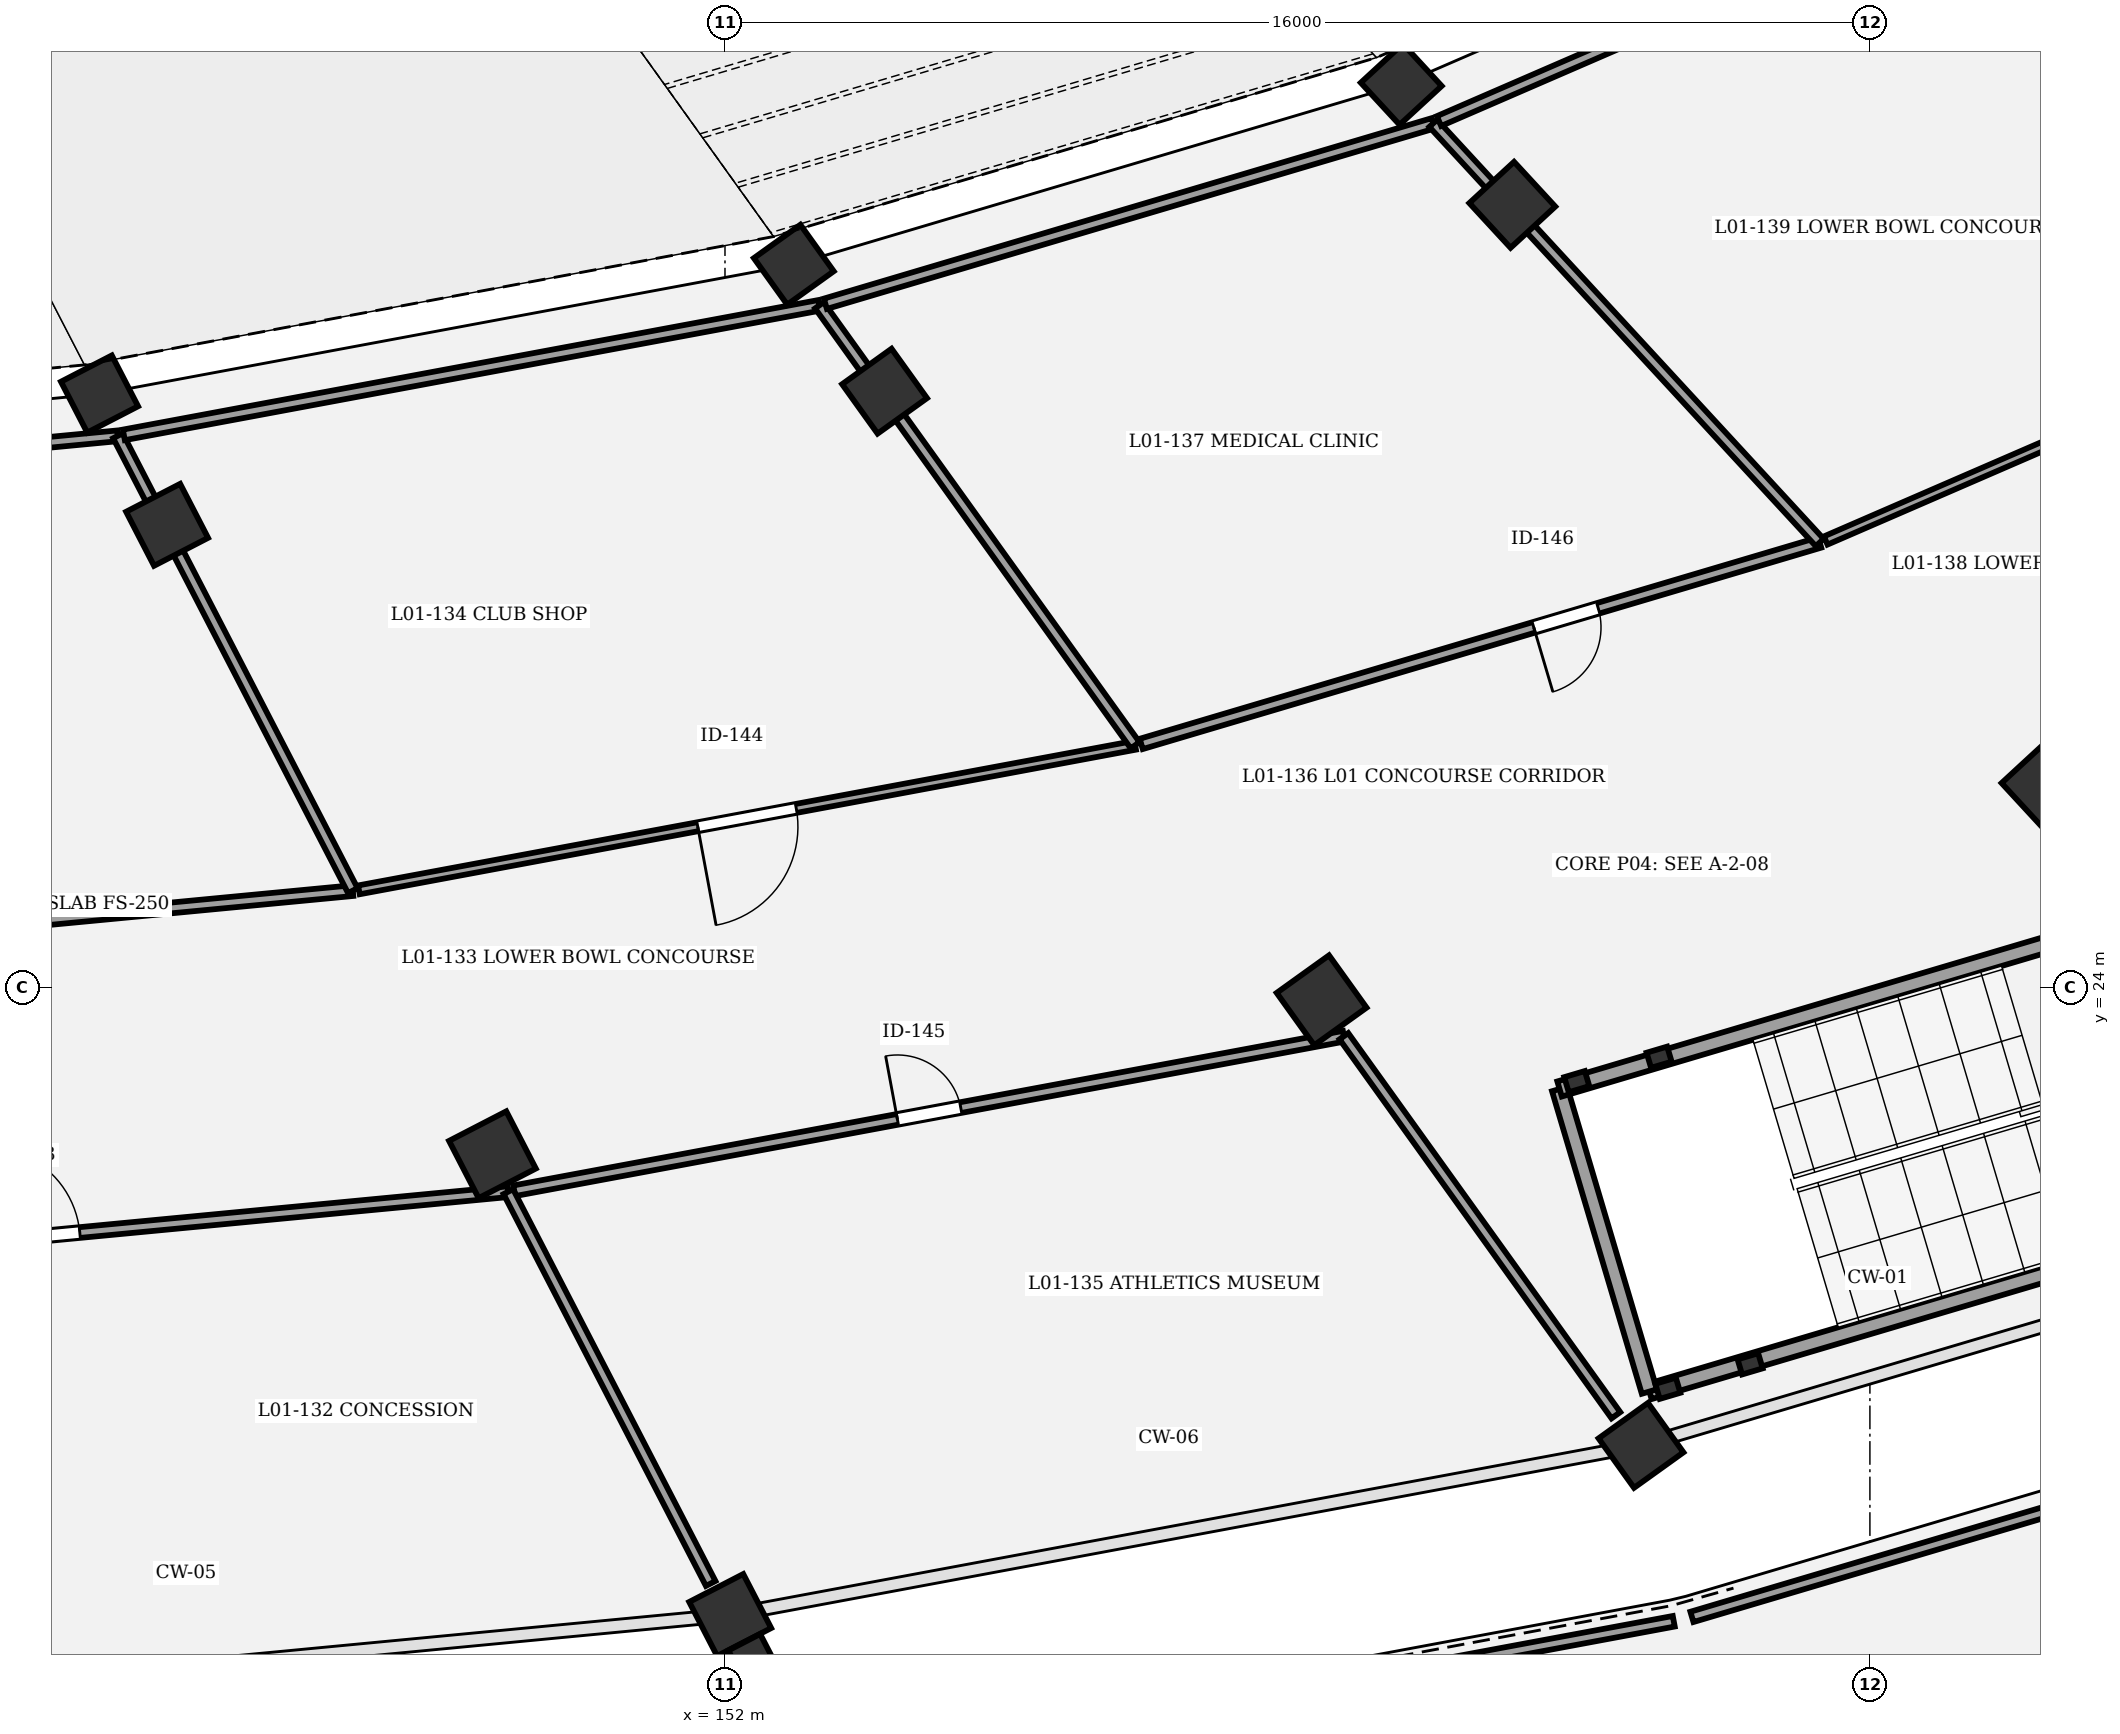
"""IFC4 building model, lengths in metres.
Left out: names, types, materials, properties, quantities, classifications, styles, units other than length and angle.
Written with IfcOpenShell. Run it as: python <this file> out.ifc"""

import sys

from ifc_helpers import new_model, si_unit, direction, frame, frame_2d, origin, origin_2d, place, context, subcontext, project, spatial, rectangle, extrude, element, fill, save


model = new_model("IFC4")
c1 = context("Model", 3, precision=1e-05, world=origin(), true_north=direction((0.0, 1.0)))
c2 = subcontext(c1, "Body", "Model", "MODEL_VIEW")
j1 = project(units=[si_unit("LENGTHUNIT", "METRE"), si_unit("PLANEANGLEUNIT", "RADIAN")], contexts=[c1])
p1 = place(None, origin())
s1 = spatial("IfcSite", under=j1, at=p1, CompositionType="ELEMENT")
p2 = place(p1, origin())
s2 = spatial("IfcBuilding", under=s1, at=p2, CompositionType="ELEMENT")
p3 = place(p2, frame((0.0, 0.0, 5.4)))
s3 = spatial("IfcBuildingStorey", under=s2, at=p3, CompositionType="ELEMENT", Elevation=5.4)
p4 = place(p3, frame((143.259, 32.294, 0.0), z_axis=(0.0, 0.0, 1.0), x_axis=(0.458959712465, -0.888457079624, 0.0)))
e1 = element("IfcColumn", 1, at=p4, inside=s3, PredefinedType="COLUMN", context=c2, shape_type="SweptSolid", body=[
    extrude(rectangle(XDim=0.8, YDim=0.8, at=origin_2d()), origin(), (0.0, 0.0, 1.0), 4.8),
])
p5 = place(p3, frame((144.204, 30.466, 0.0), z_axis=(0.0, 0.0, 1.0), x_axis=(0.458959712465, -0.888457079624, 0.0)))
e2 = element("IfcColumn", 2, at=p5, inside=s3, PredefinedType="COLUMN", context=c2, shape_type="SweptSolid", body=[
    extrude(rectangle(XDim=0.85, YDim=0.85, at=origin_2d()), origin(), (0.0, 0.0, 1.0), 4.8),
])
p6 = place(p3, frame((148.75, 21.665, 0.0), z_axis=(0.0, 0.0, 1.0), x_axis=(0.458959712465, -0.888457079624, 0.0)))
e3 = element("IfcColumn", 3, at=p6, inside=s3, PredefinedType="COLUMN", context=c2, shape_type="SweptSolid", body=[
    extrude(rectangle(XDim=0.9, YDim=0.9, at=origin_2d()), origin(), (0.0, 0.0, 1.0), 4.8),
])
p7 = place(p3, frame((152.073, 15.233, 0.0), z_axis=(0.0, 0.0, 1.0), x_axis=(0.458959712465, -0.888457079624, 0.0)))
e4 = element("IfcColumn", 4, at=p7, inside=s3, PredefinedType="COLUMN", context=c2, shape_type="SweptSolid", body=[
    extrude(rectangle(XDim=0.85, YDim=0.85, at=origin_2d()), origin(), (0.0, 0.0, 1.0), 4.8),
])
p8 = place(p3, frame((152.35, 14.697, 0.0), z_axis=(0.0, 0.0, 1.0), x_axis=(0.888457079624, 0.458959712465, 0.0)))
e5 = element("IfcColumn", 5, at=p8, inside=s3, PredefinedType="PILASTER", context=c2, shape_type="SweptSolid", body=[
    extrude(rectangle(XDim=0.5, YDim=0.35, at=origin_2d()), origin(), (0.0, 0.0, 1.0), 4.8),
])
p9 = place(p3, frame((152.962, 34.101, 0.0), z_axis=(0.0, 0.0, 1.0), x_axis=(0.582974127943, -0.812490717577, 0.0)))
e6 = element("IfcColumn", 6, at=p9, inside=s3, PredefinedType="COLUMN", context=c2, shape_type="SweptSolid", body=[
    extrude(rectangle(XDim=0.8, YDim=0.8, at=origin_2d()), origin(), (0.0, 0.0, 1.0), 4.8),
])
p10 = place(p3, frame((154.23, 32.333, 0.0), z_axis=(0.0, 0.0, 1.0), x_axis=(0.582974127943, -0.812490717577, 0.0)))
e7 = element("IfcColumn", 7, at=p10, inside=s3, PredefinedType="COLUMN", context=c2, shape_type="SweptSolid", body=[
    extrude(rectangle(XDim=0.85, YDim=0.85, at=origin_2d()), origin(), (0.0, 0.0, 1.0), 4.8),
])
p11 = place(p3, frame((160.338, 23.823, 0.0), z_axis=(0.0, 0.0, 1.0), x_axis=(0.582974127943, -0.812490717577, 0.0)))
e8 = element("IfcColumn", 8, at=p11, inside=s3, PredefinedType="COLUMN", context=c2, shape_type="SweptSolid", body=[
    extrude(rectangle(XDim=0.9, YDim=0.9, at=origin_2d()), origin(), (0.0, 0.0, 1.0), 4.8),
])
p12 = place(p3, frame((164.801, 17.603, 0.0), z_axis=(0.0, 0.0, 1.0), x_axis=(0.582974127943, -0.812490717577, 0.0)))
e9 = element("IfcColumn", 9, at=p12, inside=s3, PredefinedType="COLUMN", context=c2, shape_type="SweptSolid", body=[
    extrude(rectangle(XDim=0.85, YDim=0.85, at=origin_2d()), origin(), (0.0, 0.0, 1.0), 4.8),
])
p13 = place(p3, frame((161.45, 36.621, 0.0), z_axis=(0.0, 0.0, 1.0), x_axis=(0.677903094969, -0.735151272753, 0.0)))
e10 = element("IfcColumn", 10, at=p13, inside=s3, PredefinedType="COLUMN", context=c2, shape_type="SweptSolid", body=[
    extrude(rectangle(XDim=0.8, YDim=0.8, at=origin_2d()), origin(), (0.0, 0.0, 1.0), 4.8),
])
p14 = place(p3, frame((163.003, 34.938, 0.0), z_axis=(0.0, 0.0, 1.0), x_axis=(0.677903094969, -0.735151272753, 0.0)))
e11 = element("IfcColumn", 11, at=p14, inside=s3, PredefinedType="COLUMN", context=c2, shape_type="SweptSolid", body=[
    extrude(rectangle(XDim=0.85, YDim=0.85, at=origin_2d()), origin(), (0.0, 0.0, 1.0), 4.8),
])
p15 = place(p3, frame((170.476, 26.832, 0.0), z_axis=(0.0, 0.0, 1.0), x_axis=(0.677903094969, -0.735151272753, 0.0)))
e12 = element("IfcColumn", 12, at=p15, inside=s3, PredefinedType="COLUMN", context=c2, shape_type="SweptSolid", body=[
    extrude(rectangle(XDim=0.9, YDim=0.9, at=origin_2d()), origin(), (0.0, 0.0, 1.0), 4.8),
])
for number, where, z_axis, x_axis in (
    (13, (165.054, 23.027, 0.0), (0.0, 0.0, 1.0), (-0.959, -0.285, 0.0)),
    (14, (163.904, 22.686, 0.0), (0.0, 0.0, 1.0), (-0.959, -0.285, 0.0)),
    (15, (165.176, 18.4, 0.0), (0.0, 0.0, 1.0), (-0.959, -0.285, 0.0)),
    (16, (166.326, 18.742, 0.0), (0.0, 0.0, 1.0), (-0.959, -0.285, 0.0)),
):
    element("IfcColumn", number, at=place(p3, frame(where, z_axis=z_axis, x_axis=x_axis)), inside=s3, PredefinedType="COLUMN", context=c2, shape_type="SweptSolid", body=[
        extrude(rectangle(XDim=0.3, YDim=0.22, at=origin_2d()), origin(), (0.0, 0.0, 1.0), 4.8),
    ])
p16 = place(p3, frame((173.105, 20.785, 0.0), z_axis=(0.0, 0.0, 1.0), x_axis=(-0.958675743706, -0.284500998997, 0.0)))
e17 = element("IfcWall", 17, at=p16, inside=s3, PredefinedType="SHEAR", context=c2, shape_type="SweptSolid", body=[
    extrude(rectangle(XDim=8.54, YDim=0.22, at=frame_2d((4.27, 0.0))), origin(), (0.0, 0.0, 1.0), 4.55),
])
p17 = place(p3, frame((163.663, 22.583, 0.0), z_axis=(0.0, 0.0, 1.0), x_axis=(0.284497328872, -0.958676832861, 0.0)))
e18 = element("IfcWall", 18, at=p17, inside=s3, PredefinedType="SHEAR", context=c2, shape_type="SweptSolid", body=[
    extrude(rectangle(XDim=4.41, YDim=0.22, at=frame_2d((2.205, 0.0))), origin(), (0.0, 0.0, 1.0), 4.55),
])
p18 = place(p3, frame((171.85, 25.013, 0.0), z_axis=(0.0, 0.0, 1.0), x_axis=(-0.95867342973, -0.284508796227, 0.0)))
e19 = element("IfcWall", 19, at=p18, inside=s3, PredefinedType="SHEAR", context=c2, shape_type="SweptSolid", body=[
    extrude(rectangle(XDim=8.54, YDim=0.22, at=frame_2d((4.27, 0.0))), origin(), (0.0, 0.0, 1.0), 4.55),
])
p19 = place(p18, frame((0.3, 0.0, 0.0)))
e20 = element("IfcOpeningElement", 20, at=p19, cuts=e19, PredefinedType="OPENING", context=c2, shape_type="SweptSolid", body=[
    extrude(rectangle(XDim=1.15, YDim=2.15, at=frame_2d((0.575, 1.075))), frame((0.0, 0.12, 0.0), z_axis=(0.0, -1.0, 0.0), x_axis=(1.0, 0.0, 0.0)), (0.0, 0.0, 1.0), 0.24),
])
p20 = place(p3, frame((146.799, 25.355, 0.0), z_axis=(0.0, 0.0, 1.0), x_axis=(-0.995485111947, -0.094917816515, 0.0)))
e21 = element("IfcWall", 21, at=p20, inside=s3, PredefinedType="PARTITIONING", context=c2, shape_type="SweptSolid", body=[
    extrude(rectangle(XDim=12.822, YDim=0.15, at=frame_2d((6.411, 0.0))), origin(), (0.0, 0.0, 1.0), 3.55),
])
p21 = place(p20, frame((5.781, 0.0, 0.0)))
e22 = element("IfcOpeningElement", 22, at=p21, cuts=e21, PredefinedType="OPENING", context=c2, shape_type="SweptSolid", body=[
    extrude(rectangle(XDim=1.26, YDim=2.3, at=frame_2d((0.63, 1.15))), frame((0.0, 0.085, 0.0), z_axis=(0.0, -1.0, 0.0), x_axis=(1.0, 0.0, 0.0)), (0.0, 0.0, 1.0), 0.17),
])
p22 = place(p3, frame((135.681, 19.881, 0.0), z_axis=(0.0, 0.0, 1.0), x_axis=(0.995484535327, 0.094923863827, 0.0)))
e23 = element("IfcWall", 23, at=p22, inside=s3, PredefinedType="PARTITIONING", context=c2, shape_type="SweptSolid", body=[
    extrude(rectangle(XDim=13.351, YDim=0.15, at=frame_2d((6.676, 0.0))), origin(), (0.0, 0.0, 1.0), 3.55),
])
p23 = place(p22, frame((6.015, 0.0, 0.0)))
e24 = element("IfcOpeningElement", 24, at=p23, cuts=e23, PredefinedType="OPENING", context=c2, shape_type="SweptSolid", body=[
    extrude(rectangle(XDim=1.32, YDim=2.3, at=frame_2d((0.66, 1.15))), frame((0.0, 0.085, 0.0), z_axis=(0.0, -1.0, 0.0), x_axis=(1.0, 0.0, 0.0)), (0.0, 0.0, 1.0), 0.17),
])
p24 = place(p3, frame((157.732, 27.386, 0.0), z_axis=(0.0, 0.0, 1.0), x_axis=(-0.983097372707, -0.183083466695, 0.0)))
e25 = element("IfcWall", 25, at=p24, inside=s3, PredefinedType="PARTITIONING", context=c2, shape_type="SweptSolid", body=[
    extrude(rectangle(XDim=11.035, YDim=0.125, at=frame_2d((5.517, 0.0))), origin(), (0.0, 0.0, 1.0), 3.55),
])
p25 = place(p24, frame((4.817, 0.0, 0.0)))
e26 = element("IfcOpeningElement", 26, at=p25, cuts=e25, PredefinedType="OPENING", context=c2, shape_type="SweptSolid", body=[
    extrude(rectangle(XDim=1.4, YDim=2.3, at=frame_2d((0.7, 1.15))), frame((0.0, 0.073, 0.0), z_axis=(0.0, -1.0, 0.0), x_axis=(1.0, 0.0, 0.0)), (0.0, 0.0, 1.0), 0.145),
])
p26 = place(p3, frame((149.055, 21.161, 0.0), z_axis=(0.0, 0.0, 1.0), x_axis=(0.983095748229, 0.183092189385, 0.0)))
e27 = element("IfcWall", 27, at=p26, inside=s3, PredefinedType="PARTITIONING", context=c2, shape_type="SweptSolid", body=[
    extrude(rectangle(XDim=11.793, YDim=0.15, at=frame_2d((5.896, 0.0))), origin(), (0.0, 0.0, 1.0), 3.55),
])
p27 = place(p26, frame((5.447, 0.0, 0.0)))
e28 = element("IfcOpeningElement", 28, at=p27, cuts=e27, PredefinedType="OPENING", context=c2, shape_type="SweptSolid", body=[
    extrude(rectangle(XDim=0.9, YDim=2.1, at=frame_2d((0.45, 1.05))), frame((0.0, 0.085, 0.0), z_axis=(0.0, -1.0, 0.0), x_axis=(1.0, 0.0, 0.0)), (0.0, 0.0, 1.0), 0.17),
])
p28 = place(p3, frame((167.299, 30.219, 0.0), z_axis=(0.0, 0.0, 1.0), x_axis=(-0.958655809656, -0.284568161629, 0.0)))
e29 = element("IfcWall", 29, at=p28, inside=s3, PredefinedType="PARTITIONING", context=c2, shape_type="SweptSolid", body=[
    extrude(rectangle(XDim=9.891, YDim=0.15, at=frame_2d((4.946, 0.0))), origin(), (0.0, 0.0, 1.0), 3.55),
])
p29 = place(p28, frame((3.229, 0.0, 0.0)))
e30 = element("IfcOpeningElement", 30, at=p29, cuts=e29, PredefinedType="OPENING", context=c2, shape_type="SweptSolid", body=[
    extrude(rectangle(XDim=0.94, YDim=2.1, at=frame_2d((0.47, 1.05))), frame((0.0, 0.085, 0.0), z_axis=(0.0, -1.0, 0.0), x_axis=(1.0, 0.0, 0.0)), (0.0, 0.0, 1.0), 0.17),
])
p30 = place(p3, frame((175.685, 33.846, 0.0), z_axis=(0.0, 0.0, 1.0), x_axis=(-0.917494590455, -0.397748257677, 0.0)))
e31 = element("IfcWall", 31, at=p30, inside=s3, PredefinedType="PARTITIONING", context=c2, shape_type="SweptSolid", body=[
    extrude(rectangle(XDim=9.049, YDim=0.125, at=frame_2d((4.525, 0.0))), origin(), (0.0, 0.0, 1.0), 3.55),
])
p31 = place(p30, frame((1.806, 0.0, 0.0)))
e32 = element("IfcOpeningElement", 32, at=p31, cuts=e31, PredefinedType="OPENING", context=c2, shape_type="SweptSolid", body=[
    extrude(rectangle(XDim=0.98, YDim=2.1, at=frame_2d((0.49, 1.05))), frame((0.0, 0.073, 0.0), z_axis=(0.0, -1.0, 0.0), x_axis=(1.0, 0.0, 0.0)), (0.0, 0.0, 1.0), 0.145),
])
p32 = place(p3, frame((132.076, 30.619, 0.0), z_axis=(0.0, 0.0, 1.0), x_axis=(0.995484580871, 0.094923386203, 0.0)))
e33 = element("IfcWall", 33, at=p32, inside=s3, PredefinedType="PARTITIONING", context=c2, shape_type="SweptSolid", body=[
    extrude(rectangle(XDim=11.492, YDim=0.15, at=frame_2d((5.746, 0.0))), origin(), (0.0, 0.0, 1.0), 3.55),
])
p33 = place(p3, frame((143.516, 31.71, 0.0), z_axis=(0.0, 0.0, 1.0), x_axis=(0.458942826051, -0.888465802615, 0.0)))
e34 = element("IfcWall", 34, at=p33, inside=s3, PredefinedType="PARTITIONING", context=c2, shape_type="SweptSolid", body=[
    extrude(rectangle(XDim=7.153, YDim=0.15, at=frame_2d((3.577, 0.0))), origin(), (0.0, 0.0, 1.0), 3.55),
])
p34 = place(p3, frame((148.972, 21.148, 0.0), z_axis=(0.0, 0.0, 1.0), x_axis=(0.45896480759, -0.888454447563, 0.0)))
e35 = element("IfcWall", 35, at=p34, inside=s3, PredefinedType="PARTITIONING", context=c2, shape_type="SweptSolid", body=[
    extrude(rectangle(XDim=6.163, YDim=0.15, at=frame_2d((3.081, 0.0))), origin(), (0.0, 0.0, 1.0), 3.55),
])
p35 = place(p3, frame((143.599, 31.723, 0.0), z_axis=(0.0, 0.0, 1.0), x_axis=(0.98309647403, 0.183088292225, 0.0)))
e36 = element("IfcWall", 36, at=p35, inside=s3, PredefinedType="PARTITIONING", context=c2, shape_type="SweptSolid", body=[
    extrude(rectangle(XDim=9.888, YDim=0.15, at=frame_2d((4.944, 0.0))), origin(), (0.0, 0.0, 1.0), 3.55),
])
p36 = place(p3, frame((153.32, 33.533, 0.0), z_axis=(0.0, 0.0, 1.0), x_axis=(0.583043547447, -0.812440903562, 0.0)))
e37 = element("IfcWall", 37, at=p36, inside=s3, PredefinedType="PARTITIONING", context=c2, shape_type="SweptSolid", body=[
    extrude(rectangle(XDim=7.567, YDim=0.15, at=frame_2d((3.783, 0.0))), origin(), (0.0, 0.0, 1.0), 3.55),
])
p37 = place(p3, frame((160.649, 23.32, 0.0), z_axis=(0.0, 0.0, 1.0), x_axis=(0.58306104439, -0.812428346696, 0.0)))
e38 = element("IfcWall", 38, at=p37, inside=s3, PredefinedType="PARTITIONING", context=c2, shape_type="SweptSolid", body=[
    extrude(rectangle(XDim=6.52, YDim=0.15, at=frame_2d((3.26, 0.0))), origin(), (0.0, 0.0, 1.0), 3.55),
])
p38 = place(p3, frame((153.403, 33.555, 0.0), z_axis=(0.0, 0.0, 1.0), x_axis=(0.958654852333, 0.284571386646, 0.0)))
e39 = element("IfcWall", 39, at=p38, inside=s3, PredefinedType="PARTITIONING", context=c2, shape_type="SweptSolid", body=[
    extrude(rectangle(XDim=8.862, YDim=0.15, at=frame_2d((4.431, 0.0))), origin(), (0.0, 0.0, 1.0), 3.55),
])
p39 = place(p3, frame((161.898, 36.077, 0.0), z_axis=(0.0, 0.0, 1.0), x_axis=(0.677844741579, -0.735205077726, 0.0)))
e40 = element("IfcWall", 40, at=p39, inside=s3, PredefinedType="PARTITIONING", context=c2, shape_type="SweptSolid", body=[
    extrude(rectangle(XDim=7.968, YDim=0.15, at=frame_2d((3.984, 0.0))), origin(), (0.0, 0.0, 1.0), 3.55),
])
p40 = place(p3, frame((161.978, 36.108, 0.0), z_axis=(0.0, 0.0, 1.0), x_axis=(0.917496646276, 0.397743515436, 0.0)))
e41 = element("IfcWall", 41, at=p40, inside=s3, PredefinedType="PARTITIONING", context=c2, shape_type="SweptSolid", body=[
    extrude(rectangle(XDim=8.106, YDim=0.15, at=frame_2d((4.053, 0.0))), origin(), (0.0, 0.0, 1.0), 3.55),
])
p41 = place(p3, frame((169.415, 39.332, 0.0), z_axis=(0.0, 0.0, 1.0), x_axis=(0.752576694707, -0.658504607869, 0.0)))
e42 = element("IfcWall", 42, at=p41, inside=s3, PredefinedType="PARTITIONING", context=c2, shape_type="SweptSolid", body=[
    extrude(rectangle(XDim=8.331, YDim=0.15, at=frame_2d((4.166, 0.0))), origin(), (0.0, 0.0, 1.0), 3.55),
])
p42 = place(p3, frame((165.513, 15.207, 0.0), z_axis=(0.0, 0.0, 1.0), x_axis=(0.95866000112, 0.284554041006, 0.0)))
e43 = element("IfcWall", 43, at=p42, inside=s3, PredefinedType="PARTITIONING", context=c2, shape_type="SweptSolid", body=[
    extrude(rectangle(XDim=8.478, YDim=0.15, at=frame_2d((4.239, 0.0))), origin(), (0.0, 0.0, 1.0), 3.55),
])
p43 = place(p3, frame((155.924, 13.407, 0.0), z_axis=(0.0, 0.0, 1.0), x_axis=(0.983095301178, 0.183094589766, 0.0)))
e44 = element("IfcWall", 44, at=p43, inside=s3, PredefinedType="PARTITIONING", context=c2, shape_type="SweptSolid", body=[
    extrude(rectangle(XDim=9.495, YDim=0.15, at=frame_2d((4.748, 0.0))), origin(), (0.0, 0.0, 1.0), 3.55),
])
p44 = place(p23, origin())
e45 = element("IfcDoor", 45, at=p44, inside=s3, OperationType="SINGLE_SWING_LEFT", PredefinedType="DOOR", context=c2, shape_type="SweptSolid", body=[
    extrude(rectangle(XDim=1.32, YDim=2.3, at=frame_2d((0.66, 1.15))), frame((0.0, 0.025, 0.0), z_axis=(0.0, -1.0, 0.0), x_axis=(1.0, 0.0, 0.0)), (0.0, 0.0, 1.0), 0.05),
])
fill(e24, e45)
p45 = place(p25, origin())
e46 = element("IfcDoor", 46, at=p45, inside=s3, OperationType="SINGLE_SWING_RIGHT", PredefinedType="DOOR", context=c2, shape_type="SweptSolid", body=[
    extrude(rectangle(XDim=1.4, YDim=2.3, at=frame_2d((0.7, 1.15))), frame((0.0, 0.025, 0.0), z_axis=(0.0, -1.0, 0.0), x_axis=(1.0, 0.0, 0.0)), (0.0, 0.0, 1.0), 0.05),
])
fill(e26, e46)
p46 = place(p27, origin())
e47 = element("IfcDoor", 47, at=p46, inside=s3, OperationType="SINGLE_SWING_LEFT", PredefinedType="DOOR", context=c2, shape_type="SweptSolid", body=[
    extrude(rectangle(XDim=0.9, YDim=2.1, at=frame_2d((0.45, 1.05))), frame((0.0, 0.025, 0.0), z_axis=(0.0, -1.0, 0.0), x_axis=(1.0, 0.0, 0.0)), (0.0, 0.0, 1.0), 0.05),
])
fill(e28, e47)
p47 = place(p29, origin())
e48 = element("IfcDoor", 48, at=p47, inside=s3, OperationType="SINGLE_SWING_RIGHT", PredefinedType="DOOR", context=c2, shape_type="SweptSolid", body=[
    extrude(rectangle(XDim=0.94, YDim=2.1, at=frame_2d((0.47, 1.05))), frame((0.0, 0.025, 0.0), z_axis=(0.0, -1.0, 0.0), x_axis=(1.0, 0.0, 0.0)), (0.0, 0.0, 1.0), 0.05),
])
fill(e30, e48)
save(model, sys.argv[1])
